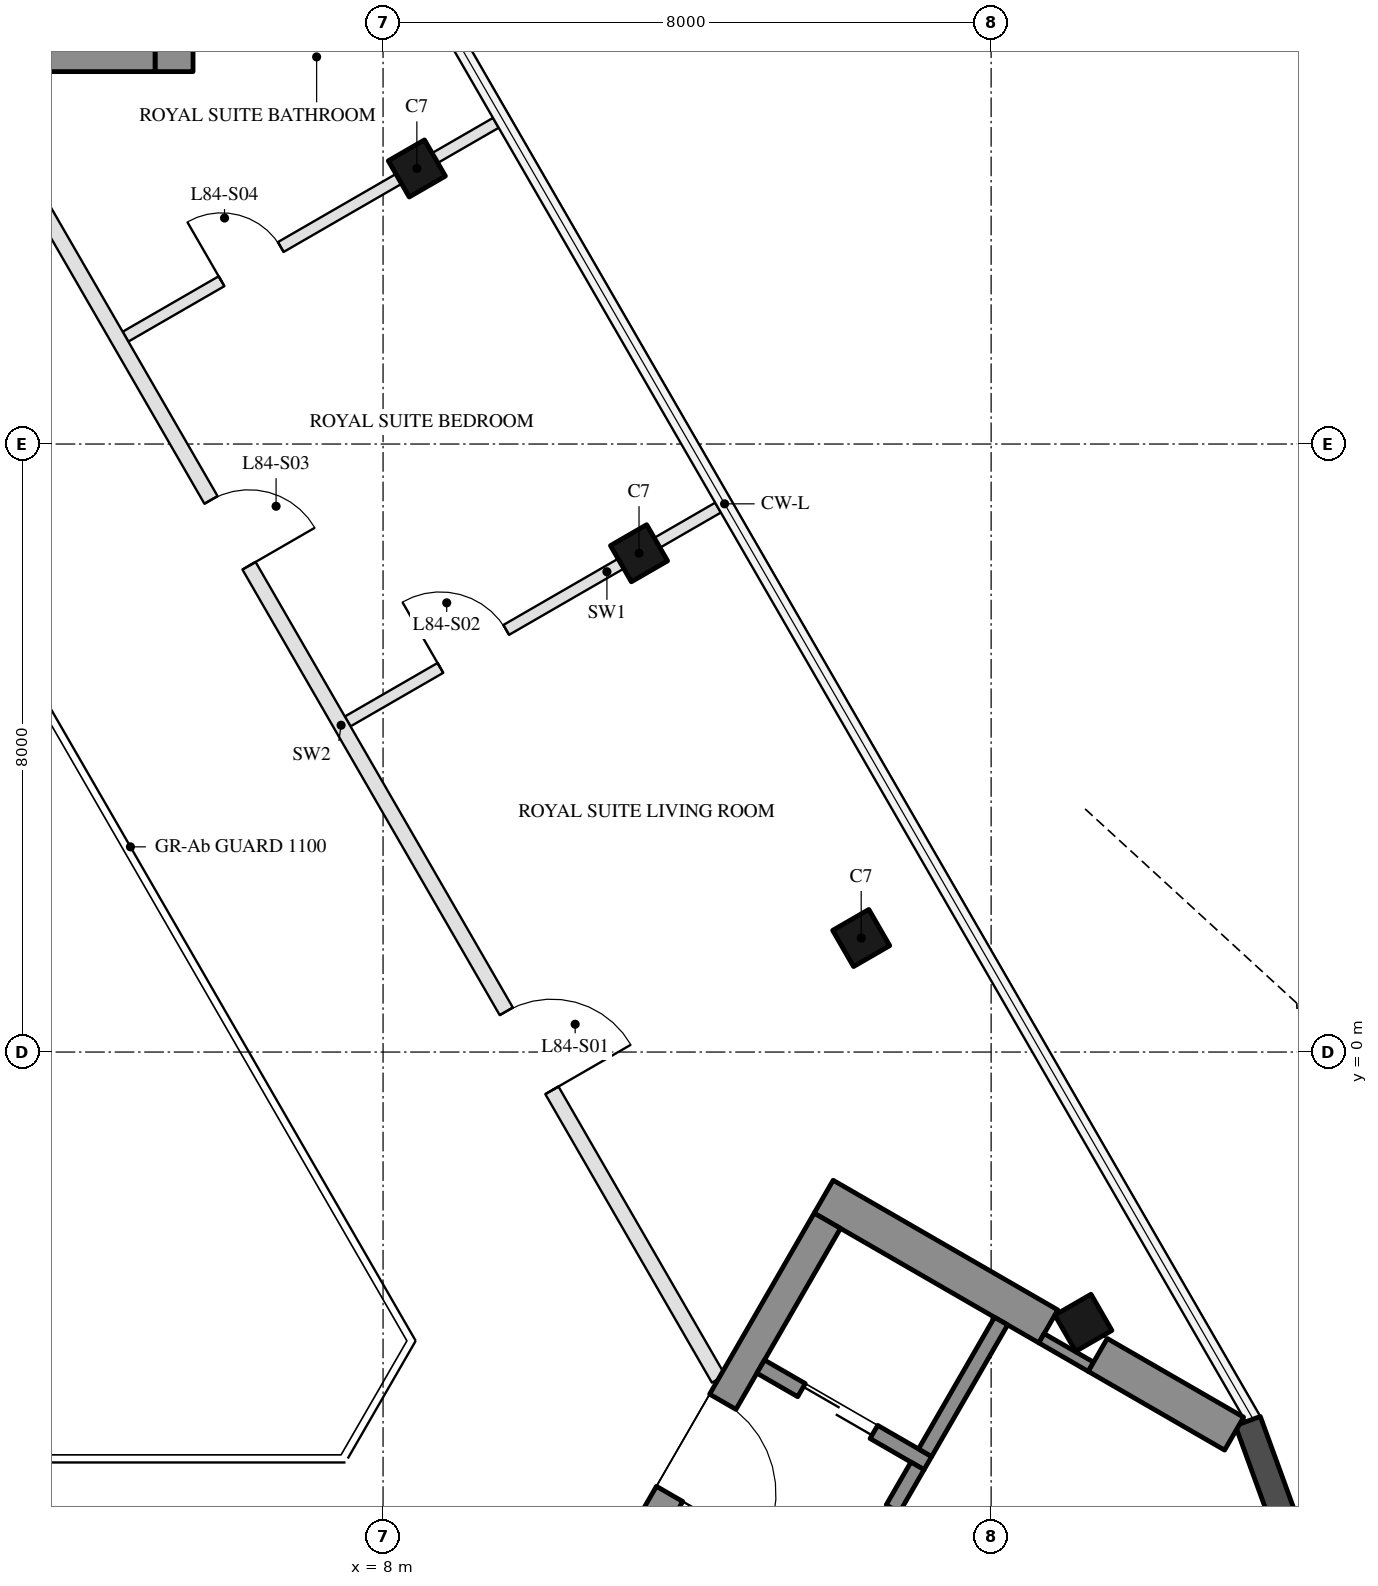
"""IFC4 building model, lengths in metres.
Left out: names, types, materials, properties, quantities, classifications, styles, units other than length and angle.
Written with IfcOpenShell. Run it as: python <this file> out.ifc"""

import sys

from ifc_helpers import new_model, si_unit, direction, frame, frame_2d, origin, origin_2d, place, context, subcontext, project, spatial, rectangle, hollow_rectangle, extrude, boolean, halfspace, element, fill, save


model = new_model("IFC4")
c1 = context("Model", 3, precision=1e-05, world=origin(), true_north=direction((0.0, 1.0)))
c2 = subcontext(c1, "Body", "Model", "MODEL_VIEW")
j1 = project(units=[si_unit("LENGTHUNIT", "METRE"), si_unit("PLANEANGLEUNIT", "RADIAN")], contexts=[c1])
p1 = place(None, origin())
s1 = spatial("IfcSite", under=j1, at=p1, CompositionType="ELEMENT")
p2 = place(p1, origin())
s2 = spatial("IfcBuilding", under=s1, at=p2, CompositionType="ELEMENT")
p3 = place(p2, frame((0.0, 0.0, 338.3)))
s3 = spatial("IfcBuildingStorey", under=s2, at=p3, CompositionType="ELEMENT", Elevation=338.3)
p4 = place(p3, frame((17.214, -3.562, 0.0), z_axis=(0.0, 0.0, 1.0), x_axis=(-0.5, 0.866025403784, 0.0)))
e1 = element("IfcColumn", 1, at=p4, inside=s3, PredefinedType="COLUMN", context=c2, shape_type="SweptSolid", body=[
    boolean("DIFFERENCE", extrude(hollow_rectangle(XDim=0.55, YDim=0.55, WallThickness=0.025, at=origin_2d()), origin(), (0.0, 0.0, 1.0), 5.0), halfspace(frame((0.0, 0.0, 0.024), z_axis=(0.0, 0.0, 1.0), x_axis=(1.0, 0.0, 0.0)), True)),
])
p5 = place(p3, frame((14.291, 1.5, 0.0), z_axis=(0.0, 0.0, 1.0), x_axis=(-0.5, 0.866025403784, 0.0)))
e2 = element("IfcColumn", 2, at=p5, inside=s3, PredefinedType="COLUMN", context=c2, shape_type="SweptSolid", body=[
    boolean("DIFFERENCE", extrude(hollow_rectangle(XDim=0.55, YDim=0.55, WallThickness=0.025, at=origin_2d()), origin(), (0.0, 0.0, 1.0), 5.0), halfspace(frame((0.0, 0.0, 0.02), z_axis=(0.0, 0.0, 1.0), x_axis=(1.0, 0.0, 0.0)), True)),
])
p6 = place(p3, frame((11.368, 6.563, 0.0), z_axis=(0.0, 0.0, 1.0), x_axis=(-0.5, 0.866025403784, 0.0)))
e3 = element("IfcColumn", 3, at=p6, inside=s3, PredefinedType="COLUMN", context=c2, shape_type="SweptSolid", body=[
    boolean("DIFFERENCE", extrude(hollow_rectangle(XDim=0.55, YDim=0.55, WallThickness=0.025, at=origin_2d()), origin(), (0.0, 0.0, 1.0), 5.0), halfspace(frame((0.0, 0.0, 0.019), z_axis=(0.0, 0.0, 1.0), x_axis=(1.0, 0.0, 0.0)), True)),
])
p7 = place(p3, frame((8.445, 11.626, 0.0), z_axis=(0.0, 0.0, 1.0), x_axis=(-0.5, 0.866025403784, 0.0)))
e4 = element("IfcColumn", 4, at=p7, inside=s3, PredefinedType="COLUMN", context=c2, shape_type="SweptSolid", body=[
    boolean("DIFFERENCE", extrude(hollow_rectangle(XDim=0.55, YDim=0.55, WallThickness=0.025, at=origin_2d()), origin(), (0.0, 0.0, 1.0), 5.0), halfspace(frame((0.0, 0.0, 0.02), z_axis=(0.0, 0.0, 1.0), x_axis=(1.0, 0.0, 0.0)), True)),
])
p8 = place(p3, frame((19.861, -6.183, 0.0), z_axis=(0.0, 0.0, 1.0), x_axis=(-0.341964928618, 0.939712715459, 0.0)))
e5 = element("IfcWall", 5, at=p8, inside=s3, PredefinedType="SOLIDWALL", context=c2, shape_type="SweptSolid", body=[
    extrude(rectangle(XDim=1.414, YDim=0.35, at=frame_2d((0.707, 0.0))), origin(), (0.0, 0.0, 1.0), 4.8),
])
p9 = place(p3, frame((5.25, 12.9, 0.0), z_axis=(0.0, 0.0, 1.0), x_axis=(0.0, 1.0, 0.0)))
e6 = element("IfcWall", 6, at=p9, inside=s3, PredefinedType="SHEAR", context=c2, shape_type="SweptSolid", body=[
    extrude(rectangle(XDim=3.413, YDim=0.5, at=frame_2d((1.707, 0.0))), origin(), (0.0, 0.0, 1.0), 4.8),
])
p10 = place(p3, frame((5.0, 13.1, 0.0), z_axis=(0.0, 0.0, 1.0), x_axis=(-1.0, 0.0, 0.0)))
e7 = element("IfcWall", 7, at=p10, inside=s3, PredefinedType="SHEAR", context=c2, shape_type="SweptSolid", body=[
    extrude(rectangle(XDim=10.0, YDim=0.4, at=frame_2d((5.0, 0.0))), origin(), (0.0, 0.0, 1.0), 4.8),
])
p11 = place(p10, frame((3.55, 0.0, 0.0)))
e8 = element("IfcOpeningElement", 8, at=p11, cuts=e7, PredefinedType="OPENING", context=c2, shape_type="SweptSolid", body=[
    extrude(rectangle(XDim=1.1, YDim=2.1, at=frame_2d((0.55, 1.05))), frame((0.0, 0.21, 0.0), z_axis=(0.0, -1.0, 0.0), x_axis=(1.0, 0.0, 0.0)), (0.0, 0.0, 1.0), 0.42),
])
p12 = place(p10, frame((5.85, 0.0, 0.0)))
e9 = element("IfcOpeningElement", 9, at=p12, cuts=e7, PredefinedType="OPENING", context=c2, shape_type="SweptSolid", body=[
    extrude(rectangle(XDim=1.4, YDim=2.1, at=frame_2d((0.7, 1.05))), frame((0.0, 0.21, 0.0), z_axis=(0.0, -1.0, 0.0), x_axis=(1.0, 0.0, 0.0)), (0.0, 0.0, 1.0), 0.42),
])
p13 = place(p3, frame((13.797, -1.903, 0.0), z_axis=(0.0, 0.0, 1.0), x_axis=(0.866024775297, -0.500001088571, 0.0)))
e10 = element("IfcWall", 10, at=p13, inside=s3, PredefinedType="SHEAR", context=c2, shape_type="SweptSolid", body=[
    extrude(rectangle(XDim=3.413, YDim=0.5, at=frame_2d((1.707, 0.0))), origin(), (0.0, 0.0, 1.0), 4.8),
])
p14 = place(p3, frame((16.663, -3.766, 0.0), z_axis=(0.0, 0.0, 1.0), x_axis=(0.86603400694, -0.499985098601, 0.0)))
e11 = element("IfcWall", 11, at=p14, inside=s3, PredefinedType="SHEAR", context=c2, shape_type="SweptSolid", body=[
    extrude(rectangle(XDim=0.751, YDim=0.14, at=frame_2d((0.375, 0.0))), origin(), (0.0, 0.0, 1.0), 4.8),
])
p15 = place(p3, frame((17.403, -3.986, 0.0), z_axis=(0.0, 0.0, 1.0), x_axis=(0.866044274939, -0.499967312778, 0.0)))
e12 = element("IfcWall", 12, at=p15, inside=s3, PredefinedType="SHEAR", context=c2, shape_type="SweptSolid", body=[
    extrude(rectangle(XDim=2.072, YDim=0.5, at=frame_2d((1.036, 0.0))), origin(), (0.0, 0.0, 1.0), 4.8),
])
p16 = place(p3, frame((8.845, -10.88, 0.0), z_axis=(0.0, 0.0, 1.0), x_axis=(0.500004234368, 0.866022959057, 0.0)))
e13 = element("IfcWall", 13, at=p16, inside=s3, PredefinedType="SHEAR", context=c2, shape_type="SweptSolid", body=[
    extrude(rectangle(XDim=10.0, YDim=0.4, at=frame_2d((5.0, 0.0))), origin(), (0.0, 0.0, 1.0), 4.8),
])
p17 = place(p16, frame((3.55, 0.0, 0.0)))
e14 = element("IfcOpeningElement", 14, at=p17, cuts=e13, PredefinedType="OPENING", context=c2, shape_type="SweptSolid", body=[
    extrude(rectangle(XDim=1.1, YDim=2.1, at=frame_2d((0.55, 1.05))), frame((0.0, 0.21, 0.0), z_axis=(0.0, -1.0, 0.0), x_axis=(1.0, 0.0, 0.0)), (0.0, 0.0, 1.0), 0.42),
])
p18 = place(p16, frame((5.85, 0.0, 0.0)))
e15 = element("IfcOpeningElement", 15, at=p18, cuts=e13, PredefinedType="OPENING", context=c2, shape_type="SweptSolid", body=[
    extrude(rectangle(XDim=1.4, YDim=2.1, at=frame_2d((0.7, 1.05))), frame((0.0, 0.21, 0.0), z_axis=(0.0, -1.0, 0.0), x_axis=(1.0, 0.0, 0.0)), (0.0, 0.0, 1.0), 0.42),
])
p19 = place(p3, frame((12.968, -4.138, 0.0), z_axis=(0.0, 0.0, 1.0), x_axis=(0.866022320763, -0.500005339912, 0.0)))
e16 = element("IfcWall", 16, at=p19, inside=s3, PredefinedType="SHEAR", context=c2, shape_type="SweptSolid", body=[
    extrude(rectangle(XDim=2.54, YDim=0.2, at=frame_2d((1.27, 0.0))), origin(), (0.0, 0.0, 1.0), 4.8),
])
p20 = place(p19, frame((0.62, 0.0, 0.0)))
e17 = element("IfcOpeningElement", 17, at=p20, cuts=e16, PredefinedType="OPENING", context=c2, shape_type="SweptSolid", body=[
    extrude(rectangle(XDim=1.1, YDim=2.1, at=frame_2d((0.55, 1.05))), frame((0.0, 0.11, 0.0), z_axis=(0.0, -1.0, 0.0), x_axis=(1.0, 0.0, 0.0)), (0.0, 0.0, 1.0), 0.22),
])
p21 = place(p3, frame((13.931, -7.35, 0.0), z_axis=(0.0, 0.0, 1.0), x_axis=(0.50002983664, 0.866008176907, 0.0)))
e18 = element("IfcWall", 18, at=p21, inside=s3, PredefinedType="SHEAR", context=c2, shape_type="SweptSolid", body=[
    extrude(rectangle(XDim=2.2, YDim=0.2, at=frame_2d((1.1, 0.0))), origin(), (0.0, 0.0, 1.0), 4.8),
])
p22 = place(p21, frame((0.65, 0.0, 0.0)))
e19 = element("IfcOpeningElement", 19, at=p22, cuts=e18, PredefinedType="OPENING", context=c2, shape_type="SweptSolid", body=[
    extrude(rectangle(XDim=0.9, YDim=2.1, at=frame_2d((0.45, 1.05))), frame((0.0, 0.11, 0.0), z_axis=(0.0, -1.0, 0.0), x_axis=(1.0, 0.0, 0.0)), (0.0, 0.0, 1.0), 0.22),
])
p23 = place(p3, frame((15.131, -5.272, 0.0), z_axis=(0.0, 0.0, 1.0), x_axis=(0.499972520799, 0.866041268327, 0.0)))
e20 = element("IfcWall", 20, at=p23, inside=s3, PredefinedType="SHEAR", context=c2, shape_type="SweptSolid", body=[
    extrude(rectangle(XDim=2.0, YDim=0.2, at=frame_2d((1.0, 0.0))), origin(), (0.0, 0.0, 1.0), 4.8),
])
p24 = place(p3, frame((12.407, 7.163, 0.0), z_axis=(0.0, 0.0, 1.0), x_axis=(-0.866039621134, -0.49997537402, 0.0)))
e21 = element("IfcWall", 21, at=p24, inside=s3, PredefinedType="PARTITIONING", context=c2, shape_type="SweptSolid", body=[
    extrude(rectangle(XDim=5.626, YDim=0.15, at=frame_2d((2.813, 0.0))), origin(), (0.0, 0.0, 1.0), 4.4),
])
p25 = place(p24, frame((3.218, 0.0, 0.0)))
e22 = element("IfcOpeningElement", 22, at=p25, cuts=e21, PredefinedType="OPENING", context=c2, shape_type="SweptSolid", body=[
    extrude(rectangle(XDim=1.0, YDim=2.1, at=frame_2d((0.5, 1.05))), frame((0.0, 0.085, 0.0), z_axis=(0.0, -1.0, 0.0), x_axis=(1.0, 0.0, 0.0)), (0.0, 0.0, 1.0), 0.17),
])
p26 = place(p3, frame((9.484, 12.226, 0.0), z_axis=(0.0, 0.0, 1.0), x_axis=(-0.866039621134, -0.49997537402, 0.0)))
e23 = element("IfcWall", 23, at=p26, inside=s3, PredefinedType="PARTITIONING", context=c2, shape_type="SweptSolid", body=[
    extrude(rectangle(XDim=5.626, YDim=0.15, at=frame_2d((2.813, 0.0))), origin(), (0.0, 0.0, 1.0), 4.4),
])
p27 = place(p26, frame((3.268, 0.0, 0.0)))
e24 = element("IfcOpeningElement", 24, at=p27, cuts=e23, PredefinedType="OPENING", context=c2, shape_type="SweptSolid", body=[
    extrude(rectangle(XDim=0.9, YDim=2.1, at=frame_2d((0.45, 1.05))), frame((0.0, 0.085, 0.0), z_axis=(0.0, -1.0, 0.0), x_axis=(1.0, 0.0, 0.0)), (0.0, 0.0, 1.0), 0.17),
])
p28 = place(p3, frame((12.413, -4.3, 0.0), z_axis=(0.0, 0.0, 1.0), x_axis=(-0.50000478328, 0.866022642139, 0.0)))
e25 = element("IfcWall", 25, at=p28, inside=s3, PredefinedType="PARTITIONING", context=c2, shape_type="SweptSolid", body=[
    extrude(rectangle(XDim=19.861, YDim=0.2, at=frame_2d((9.931, 0.0))), origin(), (0.0, 0.0, 1.0), 4.4),
])
p29 = place(p28, frame((4.384, 0.0, 0.0)))
e26 = element("IfcOpeningElement", 26, at=p29, cuts=e25, PredefinedType="OPENING", context=c2, shape_type="SweptSolid", body=[
    extrude(rectangle(XDim=1.2, YDim=2.1, at=frame_2d((0.6, 1.05))), frame((0.0, 0.11, 0.0), z_axis=(0.0, -1.0, 0.0), x_axis=(1.0, 0.0, 0.0)), (0.0, 0.0, 1.0), 0.22),
])
p30 = place(p28, frame((12.354, 0.0, 0.0)))
e27 = element("IfcOpeningElement", 27, at=p30, cuts=e25, PredefinedType="OPENING", context=c2, shape_type="SweptSolid", body=[
    extrude(rectangle(XDim=1.0, YDim=2.1, at=frame_2d((0.5, 1.05))), frame((0.0, 0.11, 0.0), z_axis=(0.0, -1.0, 0.0), x_axis=(1.0, 0.0, 0.0)), (0.0, 0.0, 1.0), 0.22),
])
p31 = place(p20, origin())
e28 = element("IfcDoor", 28, at=p31, inside=s3, OperationType="DOUBLE_DOOR_SLIDING", PredefinedType="DOOR", context=c2, shape_type="SweptSolid", body=[
    extrude(rectangle(XDim=1.1, YDim=2.1, at=frame_2d((0.55, 1.05))), frame((0.0, 0.025, 0.0), z_axis=(0.0, -1.0, 0.0), x_axis=(1.0, 0.0, 0.0)), (0.0, 0.0, 1.0), 0.05),
])
fill(e17, e28)
p32 = place(p18, frame((1.4, 0.0, 0.0), z_axis=(0.0, 0.0, 1.0), x_axis=(-1.0, 0.0, 0.0)))
e29 = element("IfcDoor", 29, at=p32, inside=s3, OperationType="DOUBLE_DOOR_SINGLE_SWING", PredefinedType="DOOR", context=c2, shape_type="SweptSolid", body=[
    extrude(rectangle(XDim=1.4, YDim=2.1, at=frame_2d((0.7, 1.05))), frame((0.0, 0.025, 0.0), z_axis=(0.0, -1.0, 0.0), x_axis=(1.0, 0.0, 0.0)), (0.0, 0.0, 1.0), 0.05),
])
fill(e15, e29)
p33 = place(p29, frame((1.2, 0.0, 0.0), z_axis=(0.0, 0.0, 1.0), x_axis=(-1.0, 0.0, 0.0)))
e30 = element("IfcDoor", 30, at=p33, inside=s3, OperationType="SINGLE_SWING_RIGHT", PredefinedType="DOOR", context=c2, shape_type="SweptSolid", body=[
    extrude(rectangle(XDim=1.2, YDim=2.1, at=frame_2d((0.6, 1.05))), frame((0.0, 0.025, 0.0), z_axis=(0.0, -1.0, 0.0), x_axis=(1.0, 0.0, 0.0)), (0.0, 0.0, 1.0), 0.05),
])
fill(e26, e30)
p34 = place(p25, frame((1.0, 0.0, 0.0), z_axis=(0.0, 0.0, 1.0), x_axis=(-1.0, 0.0, 0.0)))
e31 = element("IfcDoor", 31, at=p34, inside=s3, OperationType="SINGLE_SWING_LEFT", PredefinedType="DOOR", context=c2, shape_type="SweptSolid", body=[
    extrude(rectangle(XDim=1.0, YDim=2.1, at=frame_2d((0.5, 1.05))), frame((0.0, 0.025, 0.0), z_axis=(0.0, -1.0, 0.0), x_axis=(1.0, 0.0, 0.0)), (0.0, 0.0, 1.0), 0.05),
])
fill(e22, e31)
p35 = place(p30, frame((1.0, 0.0, 0.0), z_axis=(0.0, 0.0, 1.0), x_axis=(-1.0, 0.0, 0.0)))
e32 = element("IfcDoor", 32, at=p35, inside=s3, OperationType="SINGLE_SWING_RIGHT", PredefinedType="DOOR", context=c2, shape_type="SweptSolid", body=[
    extrude(rectangle(XDim=1.0, YDim=2.1, at=frame_2d((0.5, 1.05))), frame((0.0, 0.025, 0.0), z_axis=(0.0, -1.0, 0.0), x_axis=(1.0, 0.0, 0.0)), (0.0, 0.0, 1.0), 0.05),
])
fill(e27, e32)
p36 = place(p27, frame((0.9, 0.0, 0.0), z_axis=(0.0, 0.0, 1.0), x_axis=(-1.0, 0.0, 0.0)))
e33 = element("IfcDoor", 33, at=p36, inside=s3, OperationType="SINGLE_SWING_LEFT", PredefinedType="DOOR", context=c2, shape_type="SweptSolid", body=[
    extrude(rectangle(XDim=0.9, YDim=2.1, at=frame_2d((0.45, 1.05))), frame((0.0, 0.025, 0.0), z_axis=(0.0, -1.0, 0.0), x_axis=(1.0, 0.0, 0.0)), (0.0, 0.0, 1.0), 0.05),
])
fill(e24, e33)
save(model, sys.argv[1])
